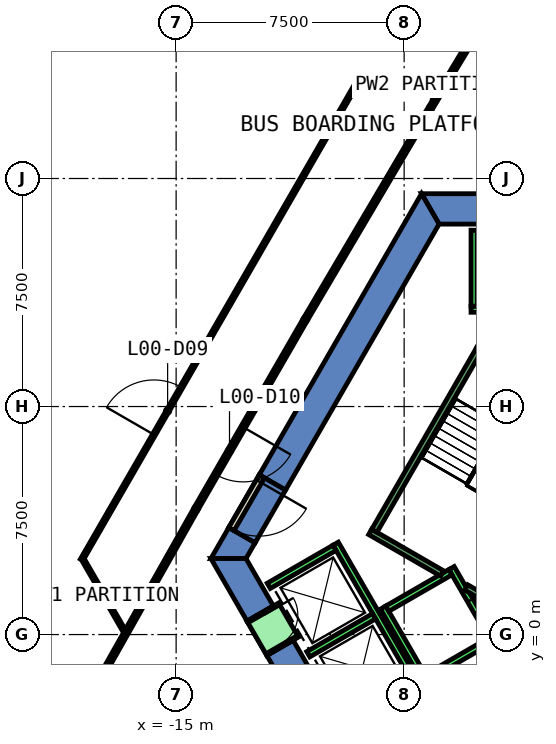
"""IFC4 building model, lengths in metres.
Left out: names, types, materials, properties, quantities, classifications, styles, units other than length and angle.
Written with IfcOpenShell. Run it as: python <this file> out.ifc"""

import sys

from ifc_helpers import new_model, si_unit, direction, frame, frame_2d, origin, place, context, subcontext, project, spatial, polyline, rectangle, outline, extrude, element, fill, save


model = new_model("IFC4")
c1 = context("Model", 3, precision=1e-05, world=origin(), true_north=direction((0.0, 1.0)))
c2 = subcontext(c1, "Body", "Model", "MODEL_VIEW")
j1 = project(units=[si_unit("LENGTHUNIT", "METRE"), si_unit("PLANEANGLEUNIT", "RADIAN")], contexts=[c1])
p1 = place(None, origin())
s1 = spatial("IfcSite", under=j1, at=p1, CompositionType="ELEMENT")
p2 = place(p1, origin())
s2 = spatial("IfcBuilding", under=s1, at=p2, CompositionType="ELEMENT")
p3 = place(p2, origin())
s3 = spatial("IfcBuildingStorey", under=s2, at=p3, CompositionType="ELEMENT", Elevation=0.0)
p4 = place(p3, frame((0.0, 0.0, -0.5)))
e1 = element("IfcWall", 1, at=p4, inside=s3, PredefinedType="SHEAR", context=c2, shape_type="SweptSolid", body=[
    extrude(outline(polyline([(-4.55, 13.5), (-4.55, 14.5), (-6.928, 14.5), (-6.351, 13.5), (-4.55, 13.5)])), origin(), (0.0, 0.0, 1.0), 9.05),
])
p5 = place(p3, frame((0.0, 0.0, -0.5)))
e2 = element("IfcWall", 2, at=p5, inside=s3, PredefinedType="SHEAR", context=c2, shape_type="SweptSolid", body=[
    extrude(outline(polyline([(-12.267, 5.252), (-11.402, 4.752), (-6.351, 13.5), (-6.928, 14.5), (-12.267, 5.252)])), origin(), (0.0, 0.0, 1.0), 9.05),
])
p6 = place(p3, frame((0.0, 0.0, -0.5)))
e3 = element("IfcWall", 3, at=p6, inside=s3, PredefinedType="SHEAR", context=c2, shape_type="SweptSolid", body=[
    extrude(outline(polyline([(-12.402, 3.02), (-13.267, 3.52), (-13.856, 2.5), (-12.702, 2.5), (-12.402, 3.02)])), origin(), (0.0, 0.0, 1.0), 9.05),
])
p7 = place(p3, frame((0.0, 0.0, 3.6)))
e4 = element("IfcWall", 4, at=p7, inside=s3, PredefinedType="SHEAR", context=c2, shape_type="SweptSolid", body=[
    extrude(outline(polyline([(-13.267, 3.52), (-12.402, 3.02), (-11.402, 4.752), (-12.267, 5.252), (-13.267, 3.52)])), origin(), (0.0, 0.0, 1.0), 4.95),
])
p8 = place(p3, frame((0.0, 0.0, -0.5)))
e5 = element("IfcWall", 5, at=p8, inside=s3, PredefinedType="SHEAR", context=c2, shape_type="SweptSolid", body=[
    extrude(outline(polyline([(-12.667, 0.44), (-11.801, 0.94), (-12.702, 2.5), (-13.856, 2.5), (-12.667, 0.44)])), origin(), (0.0, 0.0, 1.0), 9.05),
])
p9 = place(p3, frame((0.0, 0.0, -0.5)))
e6 = element("IfcWall", 6, at=p9, inside=s3, PredefinedType="SHEAR", context=c2, shape_type="SweptSolid", body=[
    extrude(outline(polyline([(-11.367, -1.811), (-10.501, -1.311), (-11.151, -0.186), (-12.017, -0.686), (-11.367, -1.811)])), origin(), (0.0, 0.0, 1.0), 9.05),
])
p10 = place(p3, frame((0.0, 0.0, 3.6)))
e7 = element("IfcWall", 7, at=p10, inside=s3, PredefinedType="SHEAR", context=c2, shape_type="SweptSolid", body=[
    extrude(outline(polyline([(-12.017, -0.686), (-11.151, -0.186), (-11.801, 0.94), (-12.667, 0.44), (-12.017, -0.686)])), origin(), (0.0, 0.0, 1.0), 4.95),
])
p11 = place(p3, frame((-5.126, -2.422, 0.0), z_axis=(0.0, 0.0, 1.0), x_axis=(-0.500062241894, 0.865989465428, 0.0)))
e8 = element("IfcWall", 8, at=p11, inside=s3, PredefinedType="PARTITIONING", context=c2, shape_type="SweptSolid", body=[
    extrude(rectangle(XDim=1.7, YDim=0.2, at=frame_2d((0.85, 0.0))), origin(), (0.0, 0.0, 1.0), 8.55),
])
p12 = place(p3, frame((-16.697, 0.101, 0.0), z_axis=(0.0, 0.0, 1.0), x_axis=(-0.499903734186, 0.866080975745, 0.0)))
e9 = element("IfcWall", 9, at=p12, inside=s3, PredefinedType="PARTITIONING", context=c2, shape_type="SweptSolid", body=[
    extrude(rectangle(XDim=2.72, YDim=0.1, at=frame_2d((1.36, 0.0))), origin(), (0.0, 0.0, 1.0), 8.55),
])
p13 = place(p3, frame((-18.107, 2.457, 0.0), z_axis=(0.0, 0.0, 1.0), x_axis=(0.499997929316, 0.866026599291, 0.0)))
e10 = element("IfcWall", 10, at=p13, inside=s3, PredefinedType="PARTITIONING", context=c2, shape_type="SweptSolid", body=[
    extrude(rectangle(XDim=18.182, YDim=0.1, at=frame_2d((9.091, 0.0))), origin(), (0.0, 0.0, 1.0), 8.55),
])
p14 = place(p13, frame((4.754, 0.0, 0.0)))
e11 = element("IfcOpeningElement", 11, at=p14, cuts=e10, PredefinedType="OPENING", context=c2, shape_type="SweptSolid", body=[
    extrude(rectangle(XDim=1.8, YDim=2.1, at=frame_2d((0.9, 1.05))), frame((0.0, 0.06, 0.0), z_axis=(0.0, -1.0, 0.0), x_axis=(1.0, 0.0, 0.0)), (0.0, 0.0, 1.0), 0.12),
])
p15 = place(p3, frame((-8.991, 18.16, 0.0), z_axis=(0.0, 0.0, 1.0), x_axis=(1.0, 0.0, 0.0)))
e12 = element("IfcWall", 12, at=p15, inside=s3, PredefinedType="PARTITIONING", context=c2, shape_type="SweptSolid", body=[
    extrude(rectangle(XDim=2.865, YDim=0.1, at=frame_2d((1.433, 0.0))), origin(), (0.0, 0.0, 1.0), 8.55),
])
p16 = place(p3, frame((-10.755, 10.354, 0.0), z_axis=(0.0, 0.0, 1.0), x_axis=(-0.49996876383, -0.866043437245, 0.0)))
e13 = element("IfcWall", 13, at=p16, inside=s3, PredefinedType="PARTITIONING", context=c2, shape_type="SweptSolid", body=[
    extrude(rectangle(XDim=7.179, YDim=0.15, at=frame_2d((3.589, 0.0))), origin(), (0.0, 0.0, 1.0), 8.55),
])
p17 = place(p16, frame((4.079, 0.0, 0.0)))
e14 = element("IfcOpeningElement", 14, at=p17, cuts=e13, PredefinedType="OPENING", context=c2, shape_type="SweptSolid", body=[
    extrude(rectangle(XDim=1.8, YDim=2.1, at=frame_2d((0.9, 1.05))), frame((0.0, 0.085, 0.0), z_axis=(0.0, -1.0, 0.0), x_axis=(1.0, 0.0, 0.0)), (0.0, 0.0, 1.0), 0.17),
])
p18 = place(p3, frame((-6.165, 18.096, 0.0), z_axis=(0.0, 0.0, 1.0), x_axis=(-0.516449409386, -0.856317702459, 0.0)))
e15 = element("IfcWall", 15, at=p18, inside=s3, PredefinedType="PARTITIONING", context=c2, shape_type="SweptSolid", body=[
    extrude(rectangle(XDim=1.818, YDim=0.15, at=frame_2d((0.909, 0.0))), origin(), (0.0, 0.0, 1.0), 8.55),
])
p19 = place(p3, frame((-7.104, 16.539, 0.0), z_axis=(0.0, 0.0, 1.0), x_axis=(-0.508323844405, -0.861165993992, 0.0)))
e16 = element("IfcWall", 16, at=p19, inside=s3, PredefinedType="PARTITIONING", context=c2, shape_type="SweptSolid", body=[
    extrude(rectangle(XDim=7.182, YDim=0.15, at=frame_2d((3.591, 0.0))), origin(), (0.0, 0.0, 1.0), 8.55),
])
p20 = place(p3, frame((-14.344, 4.137, 0.0), z_axis=(0.0, 0.0, 1.0), x_axis=(-0.491655071834, -0.870790038035, 0.0)))
e17 = element("IfcWall", 17, at=p20, inside=s3, PredefinedType="PARTITIONING", context=c2, shape_type="SweptSolid", body=[
    extrude(rectangle(XDim=7.182, YDim=0.15, at=frame_2d((3.591, 0.0))), origin(), (0.0, 0.0, 1.0), 8.55),
])
p21 = place(p3, frame((-3.394, 22.687, 0.0), z_axis=(0.0, 0.0, 1.0), x_axis=(-0.516736893328, -0.856144253659, 0.0)))
e18 = element("IfcWall", 18, at=p21, inside=s3, PredefinedType="PARTITIONING", context=c2, shape_type="SweptSolid", body=[
    extrude(rectangle(XDim=5.363, YDim=0.15, at=frame_2d((2.681, 0.0))), origin(), (0.0, 0.0, 1.0), 8.55),
])
p22 = place(p3, frame((-12.18, 5.202, 0.0), z_axis=(0.0, 0.0, 1.0), x_axis=(-0.50002537861, -0.866010750942, 0.0)))
e19 = element("IfcWall", 19, at=p22, inside=s3, PredefinedType="PARTITIONING", context=c2, shape_type="SweptSolid", body=[
    extrude(rectangle(XDim=2.0, YDim=0.2, at=frame_2d((1.0, 0.0))), origin(), (0.0, 0.0, 1.0), 2.4),
])
p23 = place(p22, frame((0.19, 0.0, 0.0)))
e20 = element("IfcOpeningElement", 20, at=p23, cuts=e19, PredefinedType="OPENING", context=c2, shape_type="SweptSolid", body=[
    extrude(rectangle(XDim=1.8, YDim=2.1, at=frame_2d((0.9, 1.05))), frame((0.0, 0.11, 0.0), z_axis=(0.0, -1.0, 0.0), x_axis=(1.0, 0.0, 0.0)), (0.0, 0.0, 1.0), 0.22),
])
p24 = place(p3, frame((5.3, 10.7, 0.0), z_axis=(0.0, 0.0, 1.0), x_axis=(-1.0, 0.0, 0.0)))
e21 = element("IfcWall", 21, at=p24, inside=s3, PredefinedType="STANDARD", context=c2, shape_type="SweptSolid", body=[
    extrude(rectangle(XDim=10.6, YDim=0.2, at=frame_2d((5.3, 0.0))), origin(), (0.0, 0.0, 1.0), 8.55),
])
p25 = place(p3, frame((-5.2, 10.8, 0.0), z_axis=(0.0, 0.0, 1.0), x_axis=(0.0, 1.0, 0.0)))
e22 = element("IfcWall", 22, at=p25, inside=s3, PredefinedType="STANDARD", context=c2, shape_type="SweptSolid", body=[
    extrude(rectangle(XDim=2.5, YDim=0.2, at=frame_2d((1.25, 0.0))), origin(), (0.0, 0.0, 1.0), 8.55),
])
p26 = place(p3, frame((-5.94, 2.188, 0.0), z_axis=(0.0, 0.0, 1.0), x_axis=(0.49994636267, -0.866056369097, 0.0)))
e23 = element("IfcWall", 23, at=p26, inside=s3, PredefinedType="STANDARD", context=c2, shape_type="SweptSolid", body=[
    extrude(rectangle(XDim=2.8, YDim=0.2, at=frame_2d((1.4, 0.0))), origin(), (0.0, 0.0, 1.0), 8.55),
])
p27 = place(p26, frame((1.225, 0.0, 0.0)))
e24 = element("IfcOpeningElement", 24, at=p27, cuts=e23, PredefinedType="OPENING", context=c2, shape_type="SweptSolid", body=[
    extrude(rectangle(XDim=1.1, YDim=2.1, at=frame_2d((0.55, 1.05))), frame((0.0, 0.11, 0.0), z_axis=(0.0, -1.0, 0.0), x_axis=(1.0, 0.0, 0.0)), (0.0, 0.0, 1.0), 0.22),
])
p28 = place(p3, frame((-8.192, 0.888, 0.0), z_axis=(0.0, 0.0, 1.0), x_axis=(0.49994636267, -0.866056369097, 0.0)))
e25 = element("IfcWall", 25, at=p28, inside=s3, PredefinedType="STANDARD", context=c2, shape_type="SweptSolid", body=[
    extrude(rectangle(XDim=2.8, YDim=0.2, at=frame_2d((1.4, 0.0))), origin(), (0.0, 0.0, 1.0), 8.55),
])
for number, where, z_axis, x_axis in (
    (26, (-5.977, 2.052, 0.0), (0.0, 0.0, 1.0), (-0.866, -0.5, 0.0)),
    (27, (-4.677, -0.2, 0.0), (0.0, 0.0, 1.0), (-0.866, -0.5, 0.0)),
):
    element("IfcWall", number, at=place(p3, frame(where, z_axis=z_axis, x_axis=x_axis)), inside=s3, PredefinedType="STANDARD", context=c2, shape_type="SweptSolid", body=[
        extrude(rectangle(XDim=2.399, YDim=0.2, at=frame_2d((1.2, 0.0))), origin(), (0.0, 0.0, 1.0), 8.55),
    ])
p29 = place(p3, frame((-9.751, 2.99, 0.0), z_axis=(0.0, 0.0, 1.0), x_axis=(0.50000090737, -0.866024879913, 0.0)))
e28 = element("IfcWall", 28, at=p29, inside=s3, PredefinedType="STANDARD", context=c2, shape_type="SweptSolid", body=[
    extrude(rectangle(XDim=10.6, YDim=0.2, at=frame_2d((5.3, 0.0))), origin(), (0.0, 0.0, 1.0), 8.55),
])
p30 = place(p3, frame((-9.788, 2.853, 0.0), z_axis=(0.0, 0.0, 1.0), x_axis=(-0.865998541277, -0.500046524342, 0.0)))
e29 = element("IfcWall", 29, at=p30, inside=s3, PredefinedType="STANDARD", context=c2, shape_type="SweptSolid", body=[
    extrude(rectangle(XDim=2.5, YDim=0.2, at=frame_2d((1.25, 0.0))), origin(), (0.0, 0.0, 1.0), 8.55),
])
p31 = place(p3, frame((-8.488, 0.602, 0.0), z_axis=(0.0, 0.0, 1.0), x_axis=(-0.866022959057, -0.500004234368, 0.0)))
e30 = element("IfcWall", 30, at=p31, inside=s3, PredefinedType="STANDARD", context=c2, shape_type="SweptSolid", body=[
    extrude(rectangle(XDim=2.5, YDim=0.2, at=frame_2d((1.25, 0.0))), origin(), (0.0, 0.0, 1.0), 8.55),
])
p32 = place(p3, frame((-12.148, 0.74, 0.0), z_axis=(0.0, 0.0, 1.0), x_axis=(0.500221244143, -0.865897630733, 0.0)))
e31 = element("IfcWall", 31, at=p32, inside=s3, PredefinedType="STANDARD", context=c2, shape_type="SweptSolid", body=[
    extrude(rectangle(XDim=1.299, YDim=1.2, at=frame_2d((0.65, 0.0))), origin(), (0.0, 0.0, 1.0), 2.4),
])
p33 = place(p32, frame((0.1, 0.0, 0.0)))
e32 = element("IfcOpeningElement", 32, at=p33, cuts=e31, PredefinedType="OPENING", context=c2, shape_type="SweptSolid", body=[
    extrude(rectangle(XDim=1.1, YDim=2.3, at=frame_2d((0.55, 1.15))), frame((0.0, 0.61, 0.0), z_axis=(0.0, -1.0, 0.0), x_axis=(1.0, 0.0, 0.0)), (0.0, 0.0, 1.0), 1.22),
])
p34 = place(p3, frame((-6.25, 2.01, 0.0), z_axis=(0.0, 0.0, 1.0), x_axis=(-0.86611865017, 0.499838457731, 0.0)))
e33 = element("IfcWall", 33, at=p34, inside=s3, PredefinedType="STANDARD", context=c2, shape_type="SweptSolid", body=[
    extrude(rectangle(XDim=2.733, YDim=0.2, at=frame_2d((1.366, 0.0))), origin(), (0.0, 0.0, 1.0), 8.55),
])
p35 = place(p3, frame((-4.806, 1.176, 0.0), z_axis=(0.0, 0.0, 1.0), x_axis=(-0.866558586415, 0.499075361355, 0.0)))
e34 = element("IfcWall", 34, at=p35, inside=s3, PredefinedType="STANDARD", context=c2, shape_type="SweptSolid", body=[
    extrude(rectangle(XDim=0.751, YDim=0.2, at=frame_2d((0.376, 0.0))), origin(), (0.0, 0.0, 1.0), 8.55),
])
p36 = place(p3, frame((-5.03, 9.388, 0.0), z_axis=(0.0, 0.0, 1.0), x_axis=(-0.499978703459, -0.866037698999, 0.0)))
e35 = element("IfcWall", 35, at=p36, inside=s3, PredefinedType="STANDARD", context=c2, shape_type="SweptSolid", body=[
    extrude(rectangle(XDim=6.9, YDim=0.2, at=frame_2d((3.45, 0.0))), origin(), (0.0, 0.0, 1.0), 8.55),
])
p37 = place(p14, origin())
e36 = element("IfcDoor", 36, at=p37, inside=s3, OperationType="DOUBLE_DOOR_SINGLE_SWING", PredefinedType="DOOR", context=c2, shape_type="SweptSolid", body=[
    extrude(rectangle(XDim=1.8, YDim=2.1, at=frame_2d((0.9, 1.05))), frame((0.0, 0.025, 0.0), z_axis=(0.0, -1.0, 0.0), x_axis=(1.0, 0.0, 0.0)), (0.0, 0.0, 1.0), 0.05),
])
fill(e11, e36)
p38 = place(p17, origin())
e37 = element("IfcDoor", 37, at=p38, inside=s3, OperationType="DOUBLE_DOOR_SINGLE_SWING", PredefinedType="DOOR", context=c2, shape_type="SweptSolid", body=[
    extrude(rectangle(XDim=1.8, YDim=2.1, at=frame_2d((0.9, 1.05))), frame((0.0, 0.025, 0.0), z_axis=(0.0, -1.0, 0.0), x_axis=(1.0, 0.0, 0.0)), (0.0, 0.0, 1.0), 0.05),
])
fill(e14, e37)
p39 = place(p23, origin())
e38 = element("IfcDoor", 38, at=p39, inside=s3, OperationType="DOUBLE_DOOR_SINGLE_SWING", PredefinedType="DOOR", context=c2, shape_type="SweptSolid", body=[
    extrude(rectangle(XDim=1.8, YDim=2.1, at=frame_2d((0.9, 1.05))), frame((0.0, 0.025, 0.0), z_axis=(0.0, -1.0, 0.0), x_axis=(1.0, 0.0, 0.0)), (0.0, 0.0, 1.0), 0.05),
])
fill(e20, e38)
p40 = place(p33, origin())
e39 = element("IfcDoor", 39, at=p40, inside=s3, OperationType="SLIDING_TO_LEFT", PredefinedType="DOOR", context=c2, shape_type="SweptSolid", body=[
    extrude(rectangle(XDim=1.1, YDim=2.3, at=frame_2d((0.55, 1.15))), frame((0.0, 0.025, 0.0), z_axis=(0.0, -1.0, 0.0), x_axis=(1.0, 0.0, 0.0)), (0.0, 0.0, 1.0), 0.05),
])
fill(e32, e39)
p41 = place(p27, origin())
e40 = element("IfcDoor", 40, at=p41, inside=s3, OperationType="SLIDING_TO_LEFT", PredefinedType="DOOR", context=c2, shape_type="SweptSolid", body=[
    extrude(rectangle(XDim=1.1, YDim=2.1, at=frame_2d((0.55, 1.05))), frame((0.0, 0.025, 0.0), z_axis=(0.0, -1.0, 0.0), x_axis=(1.0, 0.0, 0.0)), (0.0, 0.0, 1.0), 0.05),
])
fill(e24, e40)
save(model, sys.argv[1])
